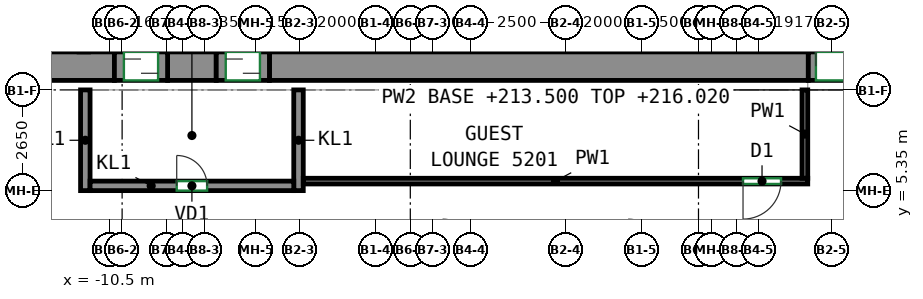
"""IFC4 building model, lengths in metres.
Left out: names, types, materials, properties, quantities, classifications, styles, units other than length and angle.
Written with IfcOpenShell. Run it as: python <this file> out.ifc"""

import sys

from ifc_helpers import new_model, si_unit, direction, frame, frame_2d, origin, place, context, subcontext, project, spatial, rectangle, extrude, source, transform, mapped, element, fill, save


model = new_model("IFC4")
c1 = context("Model", 3, precision=1e-05, world=origin(), true_north=direction((0.0, 1.0)))
c2 = subcontext(c1, "Body", "Model", "MODEL_VIEW")
j1 = project(units=[si_unit("LENGTHUNIT", "METRE"), si_unit("PLANEANGLEUNIT", "RADIAN")], contexts=[c1])
p1 = place(None, origin())
s1 = spatial("IfcSite", under=j1, at=p1, CompositionType="ELEMENT")
p2 = place(p1, origin())
s2 = spatial("IfcBuilding", under=s1, at=p2, CompositionType="ELEMENT")
p3 = place(p2, frame((0.0, 0.0, 213.5)))
s3 = spatial("IfcBuildingStorey", under=s2, at=p3, CompositionType="ELEMENT", Elevation=213.5)
m1 = source(origin(), c2, "Body", "SweptSolid", [
    extrude(rectangle(XDim=5.38, YDim=0.75, at=frame_2d((2.69, 0.0))), origin(), (0.0, 0.0, 1.0), 3.12),
])
p4 = place(p3, frame((-15.75, 8.625, 0.0), z_axis=(0.0, 0.0, 1.0), x_axis=(1.0, 0.0, 0.0)))
e1 = element("IfcWall", 1, at=p4, inside=s3, PredefinedType="SHEAR", context=c2, shape_type="MappedRepresentation", body=[
    mapped(m1, transform((0.0, 0.0, 0.0))),
])
p5 = place(p4, frame((2.0, 0.0, 0.0)))
e2 = element("IfcOpeningElement", 2, at=p5, cuts=e1, PredefinedType="OPENING", context=c2, shape_type="SweptSolid", body=[
    extrude(rectangle(XDim=1.2, YDim=2.1, at=frame_2d((0.6, 1.05))), frame((0.0, 0.385, 0.0), z_axis=(0.0, -1.0, 0.0), x_axis=(1.0, 0.0, 0.0)), (0.0, 0.0, 1.0), 0.77),
])
m2 = source(origin(), c2, "Body", "SweptSolid", [
    extrude(rectangle(XDim=1.28, YDim=0.75, at=frame_2d((0.64, 0.0))), origin(), (0.0, 0.0, 1.0), 3.12),
])
p6 = place(p3, frame((-8.97, 8.625, 0.0), z_axis=(0.0, 0.0, 1.0), x_axis=(1.0, 0.0, 0.0)))
e3 = element("IfcWall", 3, at=p6, inside=s3, PredefinedType="SHEAR", context=c2, shape_type="MappedRepresentation", body=[
    mapped(m2, transform((0.0, 0.0, 0.0))),
])
m3 = source(origin(), c2, "Body", "SweptSolid", [
    extrude(rectangle(XDim=14.18, YDim=0.75, at=frame_2d((7.09, 0.0))), origin(), (0.0, 0.0, 1.0), 3.12),
])
p7 = place(p3, frame((-6.29, 8.625, 0.0), z_axis=(0.0, 0.0, 1.0), x_axis=(1.0, 0.0, 0.0)))
e4 = element("IfcWall", 4, at=p7, inside=s3, PredefinedType="SHEAR", context=c2, shape_type="MappedRepresentation", body=[
    mapped(m3, transform((0.0, 0.0, 0.0))),
])
m4 = source(origin(), c2, "Body", "SweptSolid", [
    extrude(rectangle(XDim=2.65, YDim=0.25, at=frame_2d((1.325, 0.0))), origin(), (0.0, 0.0, 1.0), 3.12),
])
for number, where, z_axis, x_axis in (
    (5, (-11.135, 5.35, 0.0), (0.0, 0.0, 1.0), (0.0, 1.0, 0.0)),
    (6, (-5.525, 5.35, 0.0), (0.0, 0.0, 1.0), (0.0, 1.0, 0.0)),
):
    element("IfcWall", number, at=place(p3, frame(where, z_axis=z_axis, x_axis=x_axis)), inside=s3, PredefinedType="PARTITIONING", context=c2, shape_type="MappedRepresentation", body=[
        mapped(m4, transform((0.0, 0.0, 0.0))),
    ])
m5 = source(origin(), c2, "Body", "SweptSolid", [
    extrude(rectangle(XDim=5.36, YDim=0.25, at=frame_2d((2.68, 0.0))), origin(), (0.0, 0.0, 1.0), 3.12),
])
p8 = place(p3, frame((-11.01, 5.475, 0.0), z_axis=(0.0, 0.0, 1.0), x_axis=(1.0, 0.0, 0.0)))
e7 = element("IfcWall", 7, at=p8, inside=s3, PredefinedType="PARTITIONING", context=c2, shape_type="MappedRepresentation", body=[
    mapped(m5, transform((0.0, 0.0, 0.0))),
])
p9 = place(p8, frame((2.28, 0.0, 0.0)))
e8 = element("IfcOpeningElement", 8, at=p9, cuts=e7, PredefinedType="OPENING", context=c2, shape_type="SweptSolid", body=[
    extrude(rectangle(XDim=0.8, YDim=2.0, at=frame_2d((0.4, 1.0))), frame((0.0, 0.135, 0.0), z_axis=(0.0, -1.0, 0.0), x_axis=(1.0, 0.0, 0.0)), (0.0, 0.0, 1.0), 0.27),
])
m6 = source(origin(), c2, "Body", "SweptSolid", [
    extrude(rectangle(XDim=1.4, YDim=0.75, at=frame_2d((0.7, 0.0))), origin(), (0.0, 0.0, 1.0), 2.7),
])
p10 = place(p3, frame((-10.37, 8.625, 0.0), z_axis=(0.0, 0.0, 1.0), x_axis=(1.0, 0.0, 0.0)))
e9 = element("IfcWall", 9, at=p10, inside=s3, PredefinedType="PARTITIONING", context=c2, shape_type="MappedRepresentation", body=[
    mapped(m6, transform((0.0, 0.0, 0.0))),
])
p11 = place(p10, frame((0.25, 0.0, 0.0)))
e10 = element("IfcOpeningElement", 10, at=p11, cuts=e9, PredefinedType="OPENING", context=c2, shape_type="SweptSolid", body=[
    extrude(rectangle(XDim=0.9, YDim=2.1, at=frame_2d((0.45, 1.05))), frame((0.0, 0.385, 0.0), z_axis=(0.0, -1.0, 0.0), x_axis=(1.0, 0.0, 0.0)), (0.0, 0.0, 1.0), 0.77),
])
m7 = source(origin(), c2, "Body", "SweptSolid", [
    extrude(rectangle(XDim=1.4, YDim=0.75, at=frame_2d((0.7, 0.0))), origin(), (0.0, 0.0, 1.0), 2.7),
])
p12 = place(p3, frame((-7.69, 8.625, 0.0), z_axis=(0.0, 0.0, 1.0), x_axis=(1.0, 0.0, 0.0)))
e11 = element("IfcWall", 11, at=p12, inside=s3, PredefinedType="PARTITIONING", context=c2, shape_type="MappedRepresentation", body=[
    mapped(m7, transform((0.0, 0.0, 0.0))),
])
p13 = place(p12, frame((0.25, 0.0, 0.0)))
e12 = element("IfcOpeningElement", 12, at=p13, cuts=e11, PredefinedType="OPENING", context=c2, shape_type="SweptSolid", body=[
    extrude(rectangle(XDim=0.9, YDim=2.1, at=frame_2d((0.45, 1.05))), frame((0.0, 0.385, 0.0), z_axis=(0.0, -1.0, 0.0), x_axis=(1.0, 0.0, 0.0)), (0.0, 0.0, 1.0), 0.77),
])
m8 = source(origin(), c2, "Body", "SweptSolid", [
    extrude(rectangle(XDim=2.4, YDim=0.75, at=frame_2d((1.2, 0.0))), origin(), (0.0, 0.0, 1.0), 2.7),
])
p14 = place(p3, frame((7.89, 8.625, 0.0), z_axis=(0.0, 0.0, 1.0), x_axis=(1.0, 0.0, 0.0)))
e13 = element("IfcWall", 13, at=p14, inside=s3, PredefinedType="PARTITIONING", context=c2, shape_type="MappedRepresentation", body=[
    mapped(m8, transform((0.0, 0.0, 0.0))),
])
p15 = place(p14, frame((0.2, 0.0, 0.0)))
e14 = element("IfcOpeningElement", 14, at=p15, cuts=e13, PredefinedType="OPENING", context=c2, shape_type="SweptSolid", body=[
    extrude(rectangle(XDim=2.0, YDim=2.1, at=frame_2d((1.0, 1.05))), frame((0.0, 0.385, 0.0), z_axis=(0.0, -1.0, 0.0), x_axis=(1.0, 0.0, 0.0)), (0.0, 0.0, 1.0), 0.77),
])
p16 = place(p3, frame((7.875, 5.6, 0.0), z_axis=(0.0, 0.0, 1.0), x_axis=(-1.0, 0.0, 0.0)))
e15 = element("IfcWall", 15, at=p16, inside=s3, PredefinedType="PARTITIONING", context=c2, shape_type="SweptSolid", body=[
    extrude(rectangle(XDim=13.275, YDim=0.15, at=frame_2d((6.637, 0.0))), origin(), (0.0, 0.0, 1.0), 3.12),
])
p17 = place(p16, frame((0.703, 0.0, 0.0)))
e16 = element("IfcOpeningElement", 16, at=p17, cuts=e15, PredefinedType="OPENING", context=c2, shape_type="SweptSolid", body=[
    extrude(rectangle(XDim=1.0, YDim=2.1, at=frame_2d((0.5, 1.05))), frame((0.0, 0.085, 0.0), z_axis=(0.0, -1.0, 0.0), x_axis=(1.0, 0.0, 0.0)), (0.0, 0.0, 1.0), 0.17),
])
p18 = place(p3, frame((7.8, 8.0, 0.0), z_axis=(0.0, 0.0, 1.0), x_axis=(0.0, -1.0, 0.0)))
e17 = element("IfcWall", 17, at=p18, inside=s3, PredefinedType="PARTITIONING", context=c2, shape_type="SweptSolid", body=[
    extrude(rectangle(XDim=2.325, YDim=0.15, at=frame_2d((1.163, 0.0))), origin(), (0.0, 0.0, 1.0), 3.12),
])
p19 = place(p15, origin())
e18 = element("IfcDoor", 18, at=p19, inside=s3, OperationType="DOUBLE_DOOR_SINGLE_SWING", PredefinedType="DOOR", context=c2, shape_type="SweptSolid", body=[
    extrude(rectangle(XDim=2.0, YDim=2.1, at=frame_2d((1.0, 1.05))), frame((0.0, 0.28, 0.0), z_axis=(0.0, -1.0, 0.0), x_axis=(1.0, 0.0, 0.0)), (0.0, 0.0, 1.0), 0.05),
])
fill(e14, e18)
p20 = place(p9, origin())
e19 = element("IfcDoor", 19, at=p20, inside=s3, OperationType="SINGLE_SWING_LEFT", PredefinedType="DOOR", context=c2, shape_type="SweptSolid", body=[
    extrude(rectangle(XDim=0.8, YDim=2.0, at=frame_2d((0.4, 1.0))), frame((0.0, 0.025, 0.0), z_axis=(0.0, -1.0, 0.0), x_axis=(1.0, 0.0, 0.0)), (0.0, 0.0, 1.0), 0.05),
])
fill(e8, e19)
p21 = place(p11, origin())
e20 = element("IfcDoor", 20, at=p21, inside=s3, OperationType="SLIDING_TO_LEFT", PredefinedType="DOOR", context=c2, shape_type="SweptSolid", body=[
    extrude(rectangle(XDim=0.9, YDim=2.1, at=frame_2d((0.45, 1.05))), frame((0.0, 0.28, 0.0), z_axis=(0.0, -1.0, 0.0), x_axis=(1.0, 0.0, 0.0)), (0.0, 0.0, 1.0), 0.05),
])
fill(e10, e20)
p22 = place(p13, origin())
e21 = element("IfcDoor", 21, at=p22, inside=s3, OperationType="SLIDING_TO_RIGHT", PredefinedType="DOOR", context=c2, shape_type="SweptSolid", body=[
    extrude(rectangle(XDim=0.9, YDim=2.1, at=frame_2d((0.45, 1.05))), frame((0.0, 0.28, 0.0), z_axis=(0.0, -1.0, 0.0), x_axis=(1.0, 0.0, 0.0)), (0.0, 0.0, 1.0), 0.05),
])
fill(e12, e21)
p23 = place(p17, origin())
e22 = element("IfcDoor", 22, at=p23, inside=s3, OperationType="SINGLE_SWING_RIGHT", PredefinedType="DOOR", context=c2, shape_type="SweptSolid", body=[
    extrude(rectangle(XDim=1.0, YDim=2.1, at=frame_2d((0.5, 1.05))), frame((0.0, 0.025, 0.0), z_axis=(0.0, -1.0, 0.0), x_axis=(1.0, 0.0, 0.0)), (0.0, 0.0, 1.0), 0.05),
])
fill(e16, e22)
save(model, sys.argv[1])
